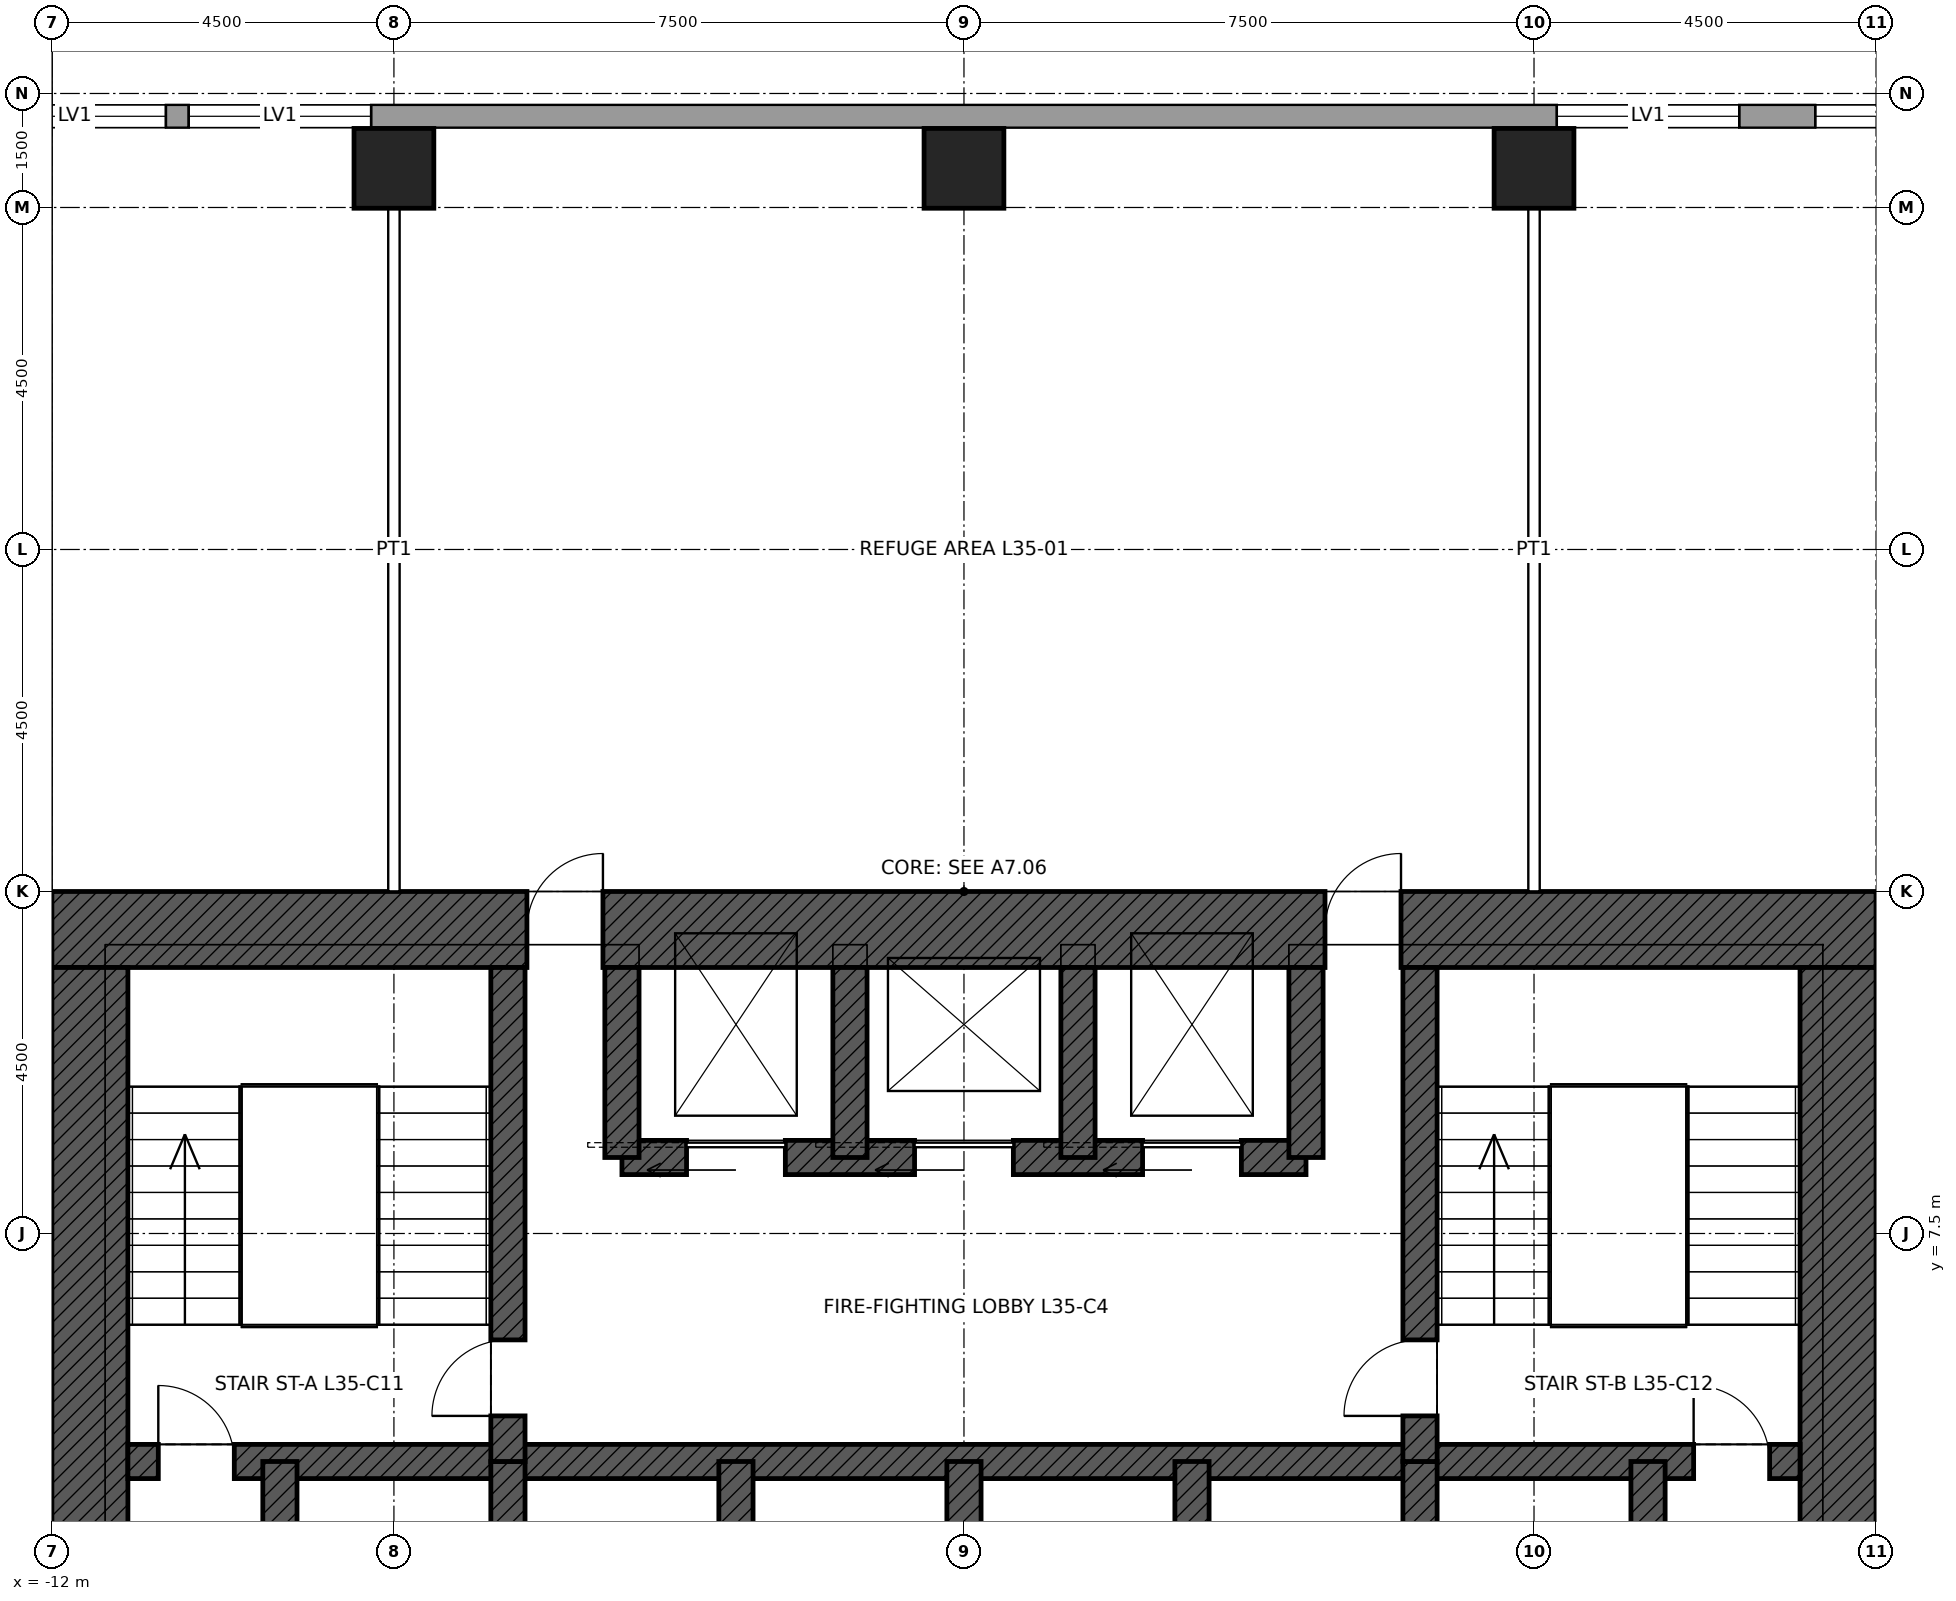
"""IFC4 building model, lengths in metres.
Left out: names, types, materials, properties, quantities, classifications, styles, units other than length and angle.
Written with IfcOpenShell. Run it as: python <this file> out.ifc"""

import sys

from ifc_helpers import new_model, si_unit, direction, frame, frame_2d, origin, origin_2d, place, context, subcontext, project, spatial, rectangle, hollow_rectangle, extrude, element, fill, save


model = new_model("IFC4")
c1 = context("Model", 3, precision=1e-05, world=origin(), true_north=direction((0.0, 1.0)))
c2 = subcontext(c1, "Body", "Model", "MODEL_VIEW")
j1 = project(units=[si_unit("LENGTHUNIT", "METRE"), si_unit("PLANEANGLEUNIT", "RADIAN")], contexts=[c1])
p1 = place(None, origin())
s1 = spatial("IfcSite", under=j1, at=p1, CompositionType="ELEMENT")
p2 = place(p1, origin())
s2 = spatial("IfcBuilding", under=s1, at=p2, CompositionType="ELEMENT")
p3 = place(p2, frame((0.0, 0.0, 171.9)))
s3 = spatial("IfcBuildingStorey", under=s2, at=p3, CompositionType="ELEMENT", Elevation=171.9)
p4 = place(p3, frame((-12.0, 11.5, 0.0), z_axis=(0.0, 0.0, 1.0), x_axis=(1.0, 0.0, 0.0)))
e1 = element("IfcWall", 1, at=p4, inside=s3, PredefinedType="SHEAR", context=c2, shape_type="SweptSolid", body=[
    extrude(rectangle(XDim=24.0, YDim=1.0, at=frame_2d((12.0, 0.0))), origin(), (0.0, 0.0, 1.0), 6.0),
])
p5 = place(p4, frame((6.25, 0.0, 0.0)))
e2 = element("IfcOpeningElement", 2, at=p5, cuts=e1, PredefinedType="OPENING", context=c2, shape_type="SweptSolid", body=[
    extrude(rectangle(XDim=1.0, YDim=2.4, at=frame_2d((0.5, 1.2))), frame((0.0, 0.51, 0.0), z_axis=(0.0, -1.0, 0.0), x_axis=(1.0, 0.0, 0.0)), (0.0, 0.0, 1.0), 1.02),
])
p6 = place(p4, frame((16.75, 0.0, 0.0)))
e3 = element("IfcOpeningElement", 3, at=p6, cuts=e1, PredefinedType="OPENING", context=c2, shape_type="SweptSolid", body=[
    extrude(rectangle(XDim=1.0, YDim=2.4, at=frame_2d((0.5, 1.2))), frame((0.0, 0.51, 0.0), z_axis=(0.0, -1.0, 0.0), x_axis=(1.0, 0.0, 0.0)), (0.0, 0.0, 1.0), 1.02),
])
p7 = place(p3, frame((11.5, 11.0, 0.0), z_axis=(0.0, 0.0, 1.0), x_axis=(0.0, -1.0, 0.0)))
e4 = element("IfcWall", 4, at=p7, inside=s3, PredefinedType="SHEAR", context=c2, shape_type="SweptSolid", body=[
    extrude(rectangle(XDim=22.0, YDim=1.0, at=frame_2d((11.0, 0.0))), origin(), (0.0, 0.0, 1.0), 6.0),
])
p8 = place(p7, frame((9.0, 0.0, 0.0)))
e5 = element("IfcOpeningElement", 5, at=p8, cuts=e4, PredefinedType="OPENING", context=c2, shape_type="SweptSolid", body=[
    extrude(rectangle(XDim=1.0, YDim=2.4, at=frame_2d((0.5, 1.2))), frame((0.0, 0.51, 0.0), z_axis=(0.0, -1.0, 0.0), x_axis=(1.0, 0.0, 0.0)), (0.0, 0.0, 1.0), 1.02),
])
p9 = place(p3, frame((-11.5, -11.0, 0.0), z_axis=(0.0, 0.0, 1.0), x_axis=(0.0, 1.0, 0.0)))
e6 = element("IfcWall", 6, at=p9, inside=s3, PredefinedType="SHEAR", context=c2, shape_type="SweptSolid", body=[
    extrude(rectangle(XDim=22.0, YDim=1.0, at=frame_2d((11.0, 0.0))), origin(), (0.0, 0.0, 1.0), 6.0),
])
p10 = place(p9, frame((12.0, 0.0, 0.0)))
e7 = element("IfcOpeningElement", 7, at=p10, cuts=e6, PredefinedType="OPENING", context=c2, shape_type="SweptSolid", body=[
    extrude(rectangle(XDim=1.0, YDim=2.4, at=frame_2d((0.5, 1.2))), frame((0.0, 0.51, 0.0), z_axis=(0.0, -1.0, 0.0), x_axis=(1.0, 0.0, 0.0)), (0.0, 0.0, 1.0), 1.02),
])
p11 = place(p3, frame((-11.0, 4.5, 0.0), z_axis=(0.0, 0.0, 1.0), x_axis=(1.0, 0.0, 0.0)))
e8 = element("IfcWall", 8, at=p11, inside=s3, PredefinedType="SHEAR", context=c2, shape_type="SweptSolid", body=[
    extrude(rectangle(XDim=22.0, YDim=0.45, at=frame_2d((11.0, 0.0))), origin(), (0.0, 0.0, 1.0), 6.0),
])
p12 = place(p11, frame((0.4, 0.0, 0.0)))
e9 = element("IfcOpeningElement", 9, at=p12, cuts=e8, PredefinedType="OPENING", context=c2, shape_type="SweptSolid", body=[
    extrude(rectangle(XDim=1.0, YDim=2.1, at=frame_2d((0.5, 1.05))), frame((0.0, 0.235, 0.0), z_axis=(0.0, -1.0, 0.0), x_axis=(1.0, 0.0, 0.0)), (0.0, 0.0, 1.0), 0.47),
])
p13 = place(p11, frame((20.6, 0.0, 0.0)))
e10 = element("IfcOpeningElement", 10, at=p13, cuts=e8, PredefinedType="OPENING", context=c2, shape_type="SweptSolid", body=[
    extrude(rectangle(XDim=1.0, YDim=2.1, at=frame_2d((0.5, 1.05))), frame((0.0, 0.235, 0.0), z_axis=(0.0, -1.0, 0.0), x_axis=(1.0, 0.0, 0.0)), (0.0, 0.0, 1.0), 0.47),
])
p14 = place(p3, frame((-4.5, 8.5, 0.0), z_axis=(0.0, 0.0, 1.0), x_axis=(1.0, 0.0, 0.0)))
e11 = element("IfcWall", 11, at=p14, inside=s3, PredefinedType="SHEAR", context=c2, shape_type="SweptSolid", body=[
    extrude(rectangle(XDim=9.0, YDim=0.45, at=frame_2d((4.5, 0.0))), origin(), (0.0, 0.0, 1.0), 6.0),
])
p15 = place(p14, frame((0.85, 0.0, 0.0)))
e12 = element("IfcOpeningElement", 12, at=p15, cuts=e11, PredefinedType="OPENING", context=c2, shape_type="SweptSolid", body=[
    extrude(rectangle(XDim=1.3, YDim=2.4, at=frame_2d((0.65, 1.2))), frame((0.0, 0.235, 0.0), z_axis=(0.0, -1.0, 0.0), x_axis=(1.0, 0.0, 0.0)), (0.0, 0.0, 1.0), 0.47),
])
p16 = place(p14, frame((6.85, 0.0, 0.0)))
e13 = element("IfcOpeningElement", 13, at=p16, cuts=e11, PredefinedType="OPENING", context=c2, shape_type="SweptSolid", body=[
    extrude(rectangle(XDim=1.3, YDim=2.4, at=frame_2d((0.65, 1.2))), frame((0.0, 0.235, 0.0), z_axis=(0.0, -1.0, 0.0), x_axis=(1.0, 0.0, 0.0)), (0.0, 0.0, 1.0), 0.47),
])
p17 = place(p14, frame((3.85, 0.0, 0.0)))
e14 = element("IfcOpeningElement", 14, at=p17, cuts=e11, PredefinedType="OPENING", context=c2, shape_type="SweptSolid", body=[
    extrude(rectangle(XDim=1.3, YDim=2.4, at=frame_2d((0.65, 1.2))), frame((0.0, 0.235, 0.0), z_axis=(0.0, -1.0, 0.0), x_axis=(1.0, 0.0, 0.0)), (0.0, 0.0, 1.0), 0.47),
])
for number, where, z_axis, x_axis in (
    (15, (-9.0, 1.5, 0.0), (0.0, 0.0, 1.0), (0.0, 1.0, 0.0)),
    (16, (9.0, 1.5, 0.0), (0.0, 0.0, 1.0), (0.0, 1.0, 0.0)),
    (17, (-6.0, 1.5, 0.0), (0.0, 0.0, 1.0), (0.0, 1.0, 0.0)),
    (18, (-3.0, 1.5, 0.0), (0.0, 0.0, 1.0), (0.0, 1.0, 0.0)),
    (19, (0.0, 1.5, 0.0), (0.0, 0.0, 1.0), (0.0, 1.0, 0.0)),
    (20, (3.0, 1.5, 0.0), (0.0, 0.0, 1.0), (0.0, 1.0, 0.0)),
    (21, (6.0, 1.5, 0.0), (0.0, 0.0, 1.0), (0.0, 1.0, 0.0)),
):
    element("IfcWall", number, at=place(p3, frame(where, z_axis=z_axis, x_axis=x_axis)), inside=s3, PredefinedType="SHEAR", context=c2, shape_type="SweptSolid", body=[
        extrude(rectangle(XDim=3.0, YDim=0.45, at=frame_2d((1.5, 0.0))), origin(), (0.0, 0.0, 1.0), 6.0),
    ])
p18 = place(p3, frame((-6.0, 4.5, 0.0), z_axis=(0.0, 0.0, 1.0), x_axis=(0.0, 1.0, 0.0)))
e22 = element("IfcWall", 22, at=p18, inside=s3, PredefinedType="SHEAR", context=c2, shape_type="SweptSolid", body=[
    extrude(rectangle(XDim=6.5, YDim=0.45, at=frame_2d((3.25, 0.0))), origin(), (0.0, 0.0, 1.0), 6.0),
])
p19 = place(p18, frame((0.6, 0.0, 0.0)))
e23 = element("IfcOpeningElement", 23, at=p19, cuts=e22, PredefinedType="OPENING", context=c2, shape_type="SweptSolid", body=[
    extrude(rectangle(XDim=1.0, YDim=2.1, at=frame_2d((0.5, 1.05))), frame((0.0, 0.235, 0.0), z_axis=(0.0, -1.0, 0.0), x_axis=(1.0, 0.0, 0.0)), (0.0, 0.0, 1.0), 0.47),
])
p20 = place(p3, frame((6.0, 4.5, 0.0), z_axis=(0.0, 0.0, 1.0), x_axis=(0.0, 1.0, 0.0)))
e24 = element("IfcWall", 24, at=p20, inside=s3, PredefinedType="SHEAR", context=c2, shape_type="SweptSolid", body=[
    extrude(rectangle(XDim=6.5, YDim=0.45, at=frame_2d((3.25, 0.0))), origin(), (0.0, 0.0, 1.0), 6.0),
])
p21 = place(p20, frame((0.6, 0.0, 0.0)))
e25 = element("IfcOpeningElement", 25, at=p21, cuts=e24, PredefinedType="OPENING", context=c2, shape_type="SweptSolid", body=[
    extrude(rectangle(XDim=1.0, YDim=2.1, at=frame_2d((0.5, 1.05))), frame((0.0, 0.235, 0.0), z_axis=(0.0, -1.0, 0.0), x_axis=(1.0, 0.0, 0.0)), (0.0, 0.0, 1.0), 0.47),
])
for number, where, z_axis, x_axis in (
    (26, (-4.5, 8.5, 0.0), (0.0, 0.0, 1.0), (0.0, 1.0, 0.0)),
    (27, (4.5, 8.5, 0.0), (0.0, 0.0, 1.0), (0.0, 1.0, 0.0)),
    (28, (-1.5, 8.5, 0.0), (0.0, 0.0, 1.0), (0.0, 1.0, 0.0)),
    (29, (1.5, 8.5, 0.0), (0.0, 0.0, 1.0), (0.0, 1.0, 0.0)),
):
    element("IfcWall", number, at=place(p3, frame(where, z_axis=z_axis, x_axis=x_axis)), inside=s3, PredefinedType="SHEAR", context=c2, shape_type="SweptSolid", body=[
        extrude(rectangle(XDim=2.5, YDim=0.45, at=frame_2d((1.25, 0.0))), origin(), (0.0, 0.0, 1.0), 6.0),
    ])
for number, where, z_axis, x_axis in (
    (30, (-7.5, 21.515, -0.25), (0.0, 0.0, 1.0), (1.0, 0.0, 0.0)),
    (31, (0.0, 21.515, -0.25), (0.0, 0.0, 1.0), (1.0, 0.0, 0.0)),
    (32, (7.5, 21.515, -0.25), (0.0, 0.0, 1.0), (1.0, 0.0, 0.0)),
):
    element("IfcColumn", number, at=place(p3, frame(where, z_axis=z_axis, x_axis=x_axis)), inside=s3, PredefinedType="COLUMN", context=c2, shape_type="SweptSolid", body=[
        extrude(hollow_rectangle(XDim=1.05, YDim=1.05, WallThickness=0.07, at=origin_2d()), origin(), (0.0, 0.0, 1.0), 6.25),
    ])
p22 = place(p3, frame((-14.7, 22.2, 0.0), z_axis=(0.0, 0.0, 1.0), x_axis=(1.0, 0.0, 0.0)))
e33 = element("IfcWall", 33, at=p22, inside=s3, PredefinedType="SOLIDWALL", context=c2, shape_type="SweptSolid", body=[
    extrude(rectangle(XDim=29.4, YDim=0.3, at=frame_2d((14.7, 0.0))), origin(), (0.0, 0.0, 1.0), 5.85),
])
p23 = place(p22, frame((1.8, 0.0, 2.1)))
e34 = element("IfcOpeningElement", 34, at=p23, cuts=e33, PredefinedType="OPENING", context=c2, shape_type="SweptSolid", body=[
    extrude(rectangle(XDim=2.4, YDim=2.4, at=frame_2d((1.2, 1.2))), frame((0.0, 0.16, 0.0), z_axis=(0.0, -1.0, 0.0), x_axis=(1.0, 0.0, 0.0)), (0.0, 0.0, 1.0), 0.32),
])
p24 = place(p22, frame((4.5, 0.0, 2.1)))
e35 = element("IfcOpeningElement", 35, at=p24, cuts=e33, PredefinedType="OPENING", context=c2, shape_type="SweptSolid", body=[
    extrude(rectangle(XDim=2.4, YDim=2.4, at=frame_2d((1.2, 1.2))), frame((0.0, 0.16, 0.0), z_axis=(0.0, -1.0, 0.0), x_axis=(1.0, 0.0, 0.0)), (0.0, 0.0, 1.0), 0.32),
])
p25 = place(p22, frame((22.5, 0.0, 2.1)))
e36 = element("IfcOpeningElement", 36, at=p25, cuts=e33, PredefinedType="OPENING", context=c2, shape_type="SweptSolid", body=[
    extrude(rectangle(XDim=2.4, YDim=2.4, at=frame_2d((1.2, 1.2))), frame((0.0, 0.16, 0.0), z_axis=(0.0, -1.0, 0.0), x_axis=(1.0, 0.0, 0.0)), (0.0, 0.0, 1.0), 0.32),
])
p26 = place(p22, frame((25.9, 0.0, 2.1)))
e37 = element("IfcOpeningElement", 37, at=p26, cuts=e33, PredefinedType="OPENING", context=c2, shape_type="SweptSolid", body=[
    extrude(rectangle(XDim=2.4, YDim=2.4, at=frame_2d((1.2, 1.2))), frame((0.0, 0.16, 0.0), z_axis=(0.0, -1.0, 0.0), x_axis=(1.0, 0.0, 0.0)), (0.0, 0.0, 1.0), 0.32),
])
for number, where, z_axis, x_axis in (
    (38, (-7.5, 12.0, 0.0), (0.0, 0.0, 1.0), (0.0, 1.0, 0.0)),
    (39, (7.5, 12.0, 0.0), (0.0, 0.0, 1.0), (0.0, 1.0, 0.0)),
):
    element("IfcWall", number, at=place(p3, frame(where, z_axis=z_axis, x_axis=x_axis)), inside=s3, PredefinedType="PARTITIONING", context=c2, shape_type="SweptSolid", body=[
        extrude(rectangle(XDim=8.99, YDim=0.15, at=frame_2d((4.495, 0.0))), origin(), (0.0, 0.0, 1.0), 5.85),
    ])
p27 = place(p23, origin())
e40 = element("IfcWindow", 40, at=p27, inside=s3, PartitioningType="SINGLE_PANEL", PredefinedType="WINDOW", context=c2, shape_type="SweptSolid", body=[
    extrude(rectangle(XDim=2.4, YDim=2.4, at=frame_2d((1.2, 1.2))), frame((0.0, 0.15, 0.0), z_axis=(0.0, -1.0, 0.0), x_axis=(1.0, 0.0, 0.0)), (0.0, 0.0, 1.0), 0.06),
])
fill(e34, e40)
p28 = place(p24, origin())
e41 = element("IfcWindow", 41, at=p28, inside=s3, PartitioningType="SINGLE_PANEL", PredefinedType="WINDOW", context=c2, shape_type="SweptSolid", body=[
    extrude(rectangle(XDim=2.4, YDim=2.4, at=frame_2d((1.2, 1.2))), frame((0.0, 0.15, 0.0), z_axis=(0.0, -1.0, 0.0), x_axis=(1.0, 0.0, 0.0)), (0.0, 0.0, 1.0), 0.06),
])
fill(e35, e41)
p29 = place(p25, origin())
e42 = element("IfcWindow", 42, at=p29, inside=s3, PartitioningType="SINGLE_PANEL", PredefinedType="WINDOW", context=c2, shape_type="SweptSolid", body=[
    extrude(rectangle(XDim=2.4, YDim=2.4, at=frame_2d((1.2, 1.2))), frame((0.0, 0.15, 0.0), z_axis=(0.0, -1.0, 0.0), x_axis=(1.0, 0.0, 0.0)), (0.0, 0.0, 1.0), 0.06),
])
fill(e36, e42)
p30 = place(p26, origin())
e43 = element("IfcWindow", 43, at=p30, inside=s3, PartitioningType="SINGLE_PANEL", PredefinedType="WINDOW", context=c2, shape_type="SweptSolid", body=[
    extrude(rectangle(XDim=2.4, YDim=2.4, at=frame_2d((1.2, 1.2))), frame((0.0, 0.15, 0.0), z_axis=(0.0, -1.0, 0.0), x_axis=(1.0, 0.0, 0.0)), (0.0, 0.0, 1.0), 0.06),
])
fill(e37, e43)
p31 = place(p12, origin())
e44 = element("IfcDoor", 44, at=p31, inside=s3, OperationType="SINGLE_SWING_LEFT", PredefinedType="DOOR", context=c2, shape_type="SweptSolid", body=[
    extrude(rectangle(XDim=1.0, YDim=2.1, at=frame_2d((0.5, 1.05))), frame((0.0, 0.025, 0.0), z_axis=(0.0, -1.0, 0.0), x_axis=(1.0, 0.0, 0.0)), (0.0, 0.0, 1.0), 0.05),
])
fill(e9, e44)
p32 = place(p13, origin())
e45 = element("IfcDoor", 45, at=p32, inside=s3, OperationType="SINGLE_SWING_LEFT", PredefinedType="DOOR", context=c2, shape_type="SweptSolid", body=[
    extrude(rectangle(XDim=1.0, YDim=2.1, at=frame_2d((0.5, 1.05))), frame((0.0, 0.025, 0.0), z_axis=(0.0, -1.0, 0.0), x_axis=(1.0, 0.0, 0.0)), (0.0, 0.0, 1.0), 0.05),
])
fill(e10, e45)
p33 = place(p19, origin())
e46 = element("IfcDoor", 46, at=p33, inside=s3, OperationType="SINGLE_SWING_LEFT", PredefinedType="DOOR", context=c2, shape_type="SweptSolid", body=[
    extrude(rectangle(XDim=1.0, YDim=2.1, at=frame_2d((0.5, 1.05))), frame((0.0, 0.025, 0.0), z_axis=(0.0, -1.0, 0.0), x_axis=(1.0, 0.0, 0.0)), (0.0, 0.0, 1.0), 0.05),
])
fill(e23, e46)
p34 = place(p21, origin())
e47 = element("IfcDoor", 47, at=p34, inside=s3, OperationType="SINGLE_SWING_LEFT", PredefinedType="DOOR", context=c2, shape_type="SweptSolid", body=[
    extrude(rectangle(XDim=1.0, YDim=2.1, at=frame_2d((0.5, 1.05))), frame((0.0, 0.025, 0.0), z_axis=(0.0, -1.0, 0.0), x_axis=(1.0, 0.0, 0.0)), (0.0, 0.0, 1.0), 0.05),
])
fill(e25, e47)
p35 = place(p5, origin())
e48 = element("IfcDoor", 48, at=p35, inside=s3, OperationType="SINGLE_SWING_RIGHT", PredefinedType="DOOR", context=c2, shape_type="SweptSolid", body=[
    extrude(rectangle(XDim=1.0, YDim=2.4, at=frame_2d((0.5, 1.2))), frame((0.0, 0.485, 0.0), z_axis=(0.0, -1.0, 0.0), x_axis=(1.0, 0.0, 0.0)), (0.0, 0.0, 1.0), 0.05),
])
fill(e2, e48)
p36 = place(p6, origin())
e49 = element("IfcDoor", 49, at=p36, inside=s3, OperationType="SINGLE_SWING_RIGHT", PredefinedType="DOOR", context=c2, shape_type="SweptSolid", body=[
    extrude(rectangle(XDim=1.0, YDim=2.4, at=frame_2d((0.5, 1.2))), frame((0.0, 0.485, 0.0), z_axis=(0.0, -1.0, 0.0), x_axis=(1.0, 0.0, 0.0)), (0.0, 0.0, 1.0), 0.05),
])
fill(e3, e49)
p37 = place(p15, origin())
e50 = element("IfcDoor", 50, at=p37, inside=s3, OperationType="SLIDING_TO_LEFT", PredefinedType="DOOR", context=c2, shape_type="SweptSolid", body=[
    extrude(rectangle(XDim=1.3, YDim=2.4, at=frame_2d((0.65, 1.2))), frame((0.0, 0.025, 0.0), z_axis=(0.0, -1.0, 0.0), x_axis=(1.0, 0.0, 0.0)), (0.0, 0.0, 1.0), 0.05),
])
fill(e12, e50)
p38 = place(p16, origin())
e51 = element("IfcDoor", 51, at=p38, inside=s3, OperationType="SLIDING_TO_LEFT", PredefinedType="DOOR", context=c2, shape_type="SweptSolid", body=[
    extrude(rectangle(XDim=1.3, YDim=2.4, at=frame_2d((0.65, 1.2))), frame((0.0, 0.025, 0.0), z_axis=(0.0, -1.0, 0.0), x_axis=(1.0, 0.0, 0.0)), (0.0, 0.0, 1.0), 0.05),
])
fill(e13, e51)
p39 = place(p17, origin())
e52 = element("IfcDoor", 52, at=p39, inside=s3, OperationType="SLIDING_TO_LEFT", PredefinedType="DOOR", context=c2, shape_type="SweptSolid", body=[
    extrude(rectangle(XDim=1.3, YDim=2.4, at=frame_2d((0.65, 1.2))), frame((0.0, 0.025, 0.0), z_axis=(0.0, -1.0, 0.0), x_axis=(1.0, 0.0, 0.0)), (0.0, 0.0, 1.0), 0.05),
])
fill(e14, e52)
save(model, sys.argv[1])
